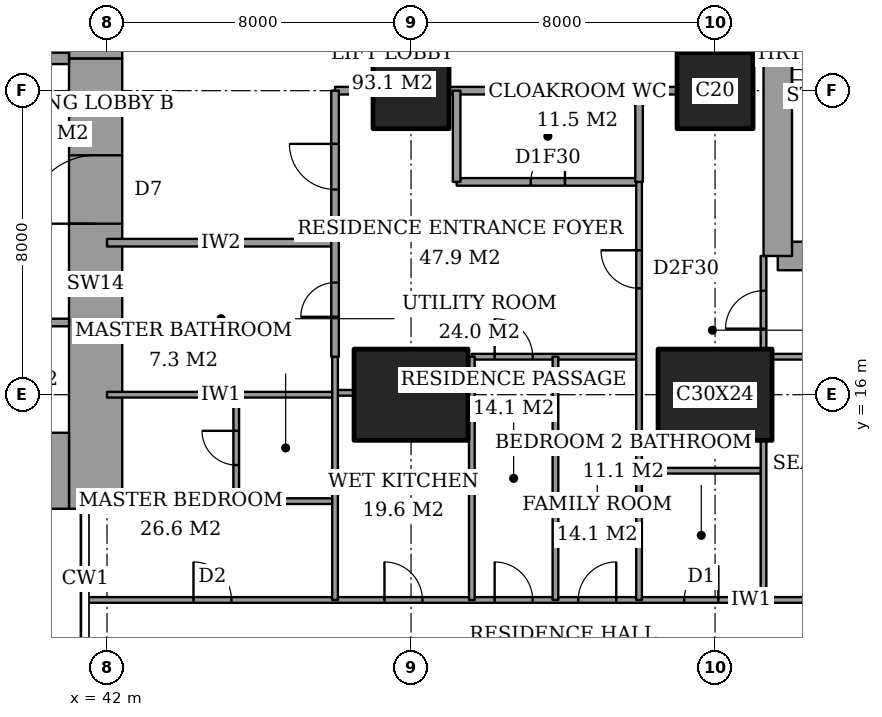
"""IFC4 building model, lengths in metres.
Left out: names, types, materials, properties, quantities, classifications, styles, units other than length and angle.
Written with IfcOpenShell. Run it as: python <this file> out.ifc"""

import sys

from ifc_helpers import new_model, si_unit, direction, frame, frame_2d, origin, origin_2d, place, context, subcontext, project, spatial, rectangle, extrude, element, fill, save


model = new_model("IFC4")
c1 = context("Model", 3, precision=1e-05, world=origin(), true_north=direction((0.0, 1.0)))
c2 = subcontext(c1, "Body", "Model", "MODEL_VIEW")
j1 = project(units=[si_unit("LENGTHUNIT", "METRE"), si_unit("PLANEANGLEUNIT", "RADIAN")], contexts=[c1])
p1 = place(None, origin())
s1 = spatial("IfcSite", under=j1, at=p1, CompositionType="ELEMENT")
p2 = place(p1, origin())
s2 = spatial("IfcBuilding", under=s1, at=p2, CompositionType="ELEMENT")
p3 = place(p2, frame((0.0, 0.0, 83.6)))
s3 = spatial("IfcBuildingStorey", under=s2, at=p3, CompositionType="ELEMENT", Elevation=83.6)
p4 = place(p3, frame((50.0, 16.0, 0.0), z_axis=(0.0, 0.0, 1.0), x_axis=(1.0, 0.0, 0.0)))
e1 = element("IfcColumn", 1, at=p4, inside=s3, PredefinedType="COLUMN", context=c2, shape_type="SweptSolid", body=[
    extrude(rectangle(XDim=3.0, YDim=2.4, at=origin_2d()), origin(), (0.0, 0.0, 1.0), 3.6),
])
p5 = place(p3, frame((50.0, 24.0, 0.0), z_axis=(0.0, 0.0, 1.0), x_axis=(1.0, 0.0, 0.0)))
e2 = element("IfcColumn", 2, at=p5, inside=s3, PredefinedType="COLUMN", context=c2, shape_type="SweptSolid", body=[
    extrude(rectangle(XDim=2.0, YDim=2.0, at=origin_2d()), origin(), (0.0, 0.0, 1.0), 3.6),
])
p6 = place(p3, frame((58.0, 16.0, 0.0), z_axis=(0.0, 0.0, 1.0), x_axis=(1.0, 0.0, 0.0)))
e3 = element("IfcColumn", 3, at=p6, inside=s3, PredefinedType="COLUMN", context=c2, shape_type="SweptSolid", body=[
    extrude(rectangle(XDim=3.0, YDim=2.4, at=origin_2d()), origin(), (0.0, 0.0, 1.0), 3.6),
])
p7 = place(p3, frame((58.0, 24.0, 0.0), z_axis=(0.0, 0.0, 1.0), x_axis=(1.0, 0.0, 0.0)))
e4 = element("IfcColumn", 4, at=p7, inside=s3, PredefinedType="COLUMN", context=c2, shape_type="SweptSolid", body=[
    extrude(rectangle(XDim=2.0, YDim=2.0, at=origin_2d()), origin(), (0.0, 0.0, 1.0), 3.6),
])
p8 = place(p3, frame((37.85, 14.0, 0.0), z_axis=(0.0, 0.0, 1.0), x_axis=(1.0, 0.0, 0.0)))
e5 = element("IfcWall", 5, at=p8, inside=s3, PredefinedType="SHEAR", context=c2, shape_type="SweptSolid", body=[
    extrude(rectangle(XDim=3.15, YDim=2.0, at=frame_2d((1.575, 0.0))), origin(), (0.0, 0.0, 1.0), 3.6),
])
p9 = place(p3, frame((41.7, 13.0, 0.0), z_axis=(0.0, 0.0, 1.0), x_axis=(0.0, 1.0, 0.0)))
e6 = element("IfcWall", 6, at=p9, inside=s3, PredefinedType="SHEAR", context=c2, shape_type="SweptSolid", body=[
    extrude(rectangle(XDim=11.85, YDim=1.4, at=frame_2d((5.925, 0.0))), origin(), (0.0, 0.0, 1.0), 3.6),
])
p10 = place(p9, frame((7.5, 0.0, 0.0)))
e7 = element("IfcOpeningElement", 7, at=p10, cuts=e6, PredefinedType="OPENING", context=c2, shape_type="SweptSolid", body=[
    extrude(rectangle(XDim=1.8, YDim=2.4, at=frame_2d((0.9, 1.2))), frame((0.0, 0.71, 0.0), z_axis=(0.0, -1.0, 0.0), x_axis=(1.0, 0.0, 0.0)), (0.0, 0.0, 1.0), 1.42),
])
p11 = place(p3, frame((41.7, 24.85, 0.0), z_axis=(0.0, 0.0, 1.0), x_axis=(0.0, 1.0, 0.0)))
e8 = element("IfcWall", 8, at=p11, inside=s3, PredefinedType="SHEAR", context=c2, shape_type="SweptSolid", body=[
    extrude(rectangle(XDim=10.15, YDim=1.4, at=frame_2d((5.075, 0.0))), origin(), (0.0, 0.0, 1.0), 3.6),
])
p12 = place(p3, frame((37.85, 24.85, 0.0), z_axis=(0.0, 0.0, 1.0), x_axis=(1.0, 0.0, 0.0)))
e9 = element("IfcWall", 9, at=p12, inside=s3, PredefinedType="SHEAR", context=c2, shape_type="SweptSolid", body=[
    extrude(rectangle(XDim=3.15, YDim=0.3, at=frame_2d((1.575, 0.0))), origin(), (0.0, 0.0, 1.0), 3.6),
])
p13 = place(p12, frame((0.95, 0.0, 0.0)))
e10 = element("IfcOpeningElement", 10, at=p13, cuts=e9, PredefinedType="OPENING", context=c2, shape_type="SweptSolid", body=[
    extrude(rectangle(XDim=1.0, YDim=2.1, at=frame_2d((0.5, 1.05))), frame((0.0, 0.16, 0.0), z_axis=(0.0, -1.0, 0.0), x_axis=(1.0, 0.0, 0.0)), (0.0, 0.0, 1.0), 0.32),
])
p14 = place(p3, frame((59.65, 19.65, 0.0), z_axis=(0.0, 0.0, 1.0), x_axis=(1.0, 0.0, 0.0)))
e11 = element("IfcWall", 11, at=p14, inside=s3, PredefinedType="SHEAR", context=c2, shape_type="SweptSolid", body=[
    extrude(rectangle(XDim=4.45, YDim=0.75, at=frame_2d((2.225, 0.0))), origin(), (0.0, 0.0, 1.0), 3.6),
])
p15 = place(p3, frame((59.65, 28.35, 0.0), z_axis=(0.0, 0.0, 1.0), x_axis=(0.0, -1.0, 0.0)))
e12 = element("IfcWall", 12, at=p15, inside=s3, PredefinedType="SHEAR", context=c2, shape_type="SweptSolid", body=[
    extrude(rectangle(XDim=8.7, YDim=0.75, at=frame_2d((4.35, 0.0))), origin(), (0.0, 0.0, 1.0), 3.6),
])
p16 = place(p15, frame((0.975, 0.0, 0.0)))
e13 = element("IfcOpeningElement", 13, at=p16, cuts=e12, PredefinedType="OPENING", context=c2, shape_type="SweptSolid", body=[
    extrude(rectangle(XDim=1.0, YDim=2.1, at=frame_2d((0.5, 1.05))), frame((0.0, 0.385, 0.0), z_axis=(0.0, -1.0, 0.0), x_axis=(1.0, 0.0, 0.0)), (0.0, 0.0, 1.0), 0.77),
])
p17 = place(p3, frame((41.439, 10.6, 0.0), z_axis=(0.0, 0.0, 1.0), x_axis=(1.0, 0.0, 0.0)))
e14 = element("IfcWall", 14, at=p17, inside=s3, PredefinedType="PARTITIONING", context=c2, shape_type="SweptSolid", body=[
    extrude(rectangle(XDim=25.011, YDim=0.15, at=frame_2d((12.505, 0.0))), origin(), (0.0, 0.0, 1.0), 3.35),
])
p18 = place(p17, frame((10.761, 0.0, 0.0)))
e15 = element("IfcOpeningElement", 15, at=p18, cuts=e14, PredefinedType="OPENING", context=c2, shape_type="SweptSolid", body=[
    extrude(rectangle(XDim=1.0, YDim=2.1, at=frame_2d((0.5, 1.05))), frame((0.0, 0.085, 0.0), z_axis=(0.0, -1.0, 0.0), x_axis=(1.0, 0.0, 0.0)), (0.0, 0.0, 1.0), 0.17),
])
p19 = place(p17, frame((20.924, 0.0, 0.0)))
e16 = element("IfcOpeningElement", 16, at=p19, cuts=e14, PredefinedType="OPENING", context=c2, shape_type="SweptSolid", body=[
    extrude(rectangle(XDim=1.0, YDim=2.1, at=frame_2d((0.5, 1.05))), frame((0.0, 0.085, 0.0), z_axis=(0.0, -1.0, 0.0), x_axis=(1.0, 0.0, 0.0)), (0.0, 0.0, 1.0), 0.17),
])
p20 = place(p17, frame((15.749, 0.0, 0.0)))
e17 = element("IfcOpeningElement", 17, at=p20, cuts=e14, PredefinedType="OPENING", context=c2, shape_type="SweptSolid", body=[
    extrude(rectangle(XDim=0.9, YDim=2.1, at=frame_2d((0.45, 1.05))), frame((0.0, 0.085, 0.0), z_axis=(0.0, -1.0, 0.0), x_axis=(1.0, 0.0, 0.0)), (0.0, 0.0, 1.0), 0.17),
])
p21 = place(p17, frame((12.961, 0.0, 0.0)))
e18 = element("IfcOpeningElement", 18, at=p21, cuts=e14, PredefinedType="OPENING", context=c2, shape_type="SweptSolid", body=[
    extrude(rectangle(XDim=1.0, YDim=2.1, at=frame_2d((0.5, 1.05))), frame((0.0, 0.085, 0.0), z_axis=(0.0, -1.0, 0.0), x_axis=(1.0, 0.0, 0.0)), (0.0, 0.0, 1.0), 0.17),
])
p22 = place(p17, frame((7.861, 0.0, 0.0)))
e19 = element("IfcOpeningElement", 19, at=p22, cuts=e14, PredefinedType="OPENING", context=c2, shape_type="SweptSolid", body=[
    extrude(rectangle(XDim=1.0, YDim=2.1, at=frame_2d((0.5, 1.05))), frame((0.0, 0.085, 0.0), z_axis=(0.0, -1.0, 0.0), x_axis=(1.0, 0.0, 0.0)), (0.0, 0.0, 1.0), 0.17),
])
p23 = place(p17, frame((2.836, 0.0, 0.0)))
e20 = element("IfcOpeningElement", 20, at=p23, cuts=e14, PredefinedType="OPENING", context=c2, shape_type="SweptSolid", body=[
    extrude(rectangle(XDim=1.0, YDim=2.1, at=frame_2d((0.5, 1.05))), frame((0.0, 0.085, 0.0), z_axis=(0.0, -1.0, 0.0), x_axis=(1.0, 0.0, 0.0)), (0.0, 0.0, 1.0), 0.17),
])
p24 = place(p3, frame((45.4, 13.2, 0.0), z_axis=(0.0, 0.0, 1.0), x_axis=(1.0, 0.0, 0.0)))
e21 = element("IfcWall", 21, at=p24, inside=s3, PredefinedType="PARTITIONING", context=c2, shape_type="SweptSolid", body=[
    extrude(rectangle(XDim=2.6, YDim=0.15, at=frame_2d((1.3, 0.0))), origin(), (0.0, 0.0, 1.0), 3.35),
])
p25 = place(p3, frame((56.0, 14.0, 0.0), z_axis=(0.0, 0.0, 1.0), x_axis=(1.0, 0.0, 0.0)))
e22 = element("IfcWall", 22, at=p25, inside=s3, PredefinedType="PARTITIONING", context=c2, shape_type="SweptSolid", body=[
    extrude(rectangle(XDim=3.275, YDim=0.15, at=frame_2d((1.637, 0.0))), origin(), (0.0, 0.0, 1.0), 3.35),
])
p26 = place(p3, frame((42.0, 16.0, 0.0), z_axis=(0.0, 0.0, 1.0), x_axis=(1.0, 0.0, 0.0)))
e23 = element("IfcWall", 23, at=p26, inside=s3, PredefinedType="PARTITIONING", context=c2, shape_type="SweptSolid", body=[
    extrude(rectangle(XDim=6.0, YDim=0.15, at=frame_2d((3.0, 0.0))), origin(), (0.0, 0.0, 1.0), 2.634),
])
p27 = place(p3, frame((48.0, 16.05, 0.0), z_axis=(0.0, 0.0, 1.0), x_axis=(1.0, 0.0, 0.0)))
e24 = element("IfcWall", 24, at=p27, inside=s3, PredefinedType="PARTITIONING", context=c2, shape_type="SweptSolid", body=[
    extrude(rectangle(XDim=0.5, YDim=0.15, at=frame_2d((0.25, 0.0))), origin(), (0.0, 0.0, 1.0), 2.634),
])
p28 = place(p3, frame((51.6, 17.0, 0.0), z_axis=(0.0, 0.0, 1.0), x_axis=(1.0, 0.0, 0.0)))
e25 = element("IfcWall", 25, at=p28, inside=s3, PredefinedType="PARTITIONING", context=c2, shape_type="SweptSolid", body=[
    extrude(rectangle(XDim=4.4, YDim=0.15, at=frame_2d((2.2, 0.0))), origin(), (0.0, 0.0, 1.0), 3.35),
])
p29 = place(p28, frame((0.6, 0.0, 0.0)))
e26 = element("IfcOpeningElement", 26, at=p29, cuts=e25, PredefinedType="OPENING", context=c2, shape_type="SweptSolid", body=[
    extrude(rectangle(XDim=1.0, YDim=2.1, at=frame_2d((0.5, 1.05))), frame((0.0, 0.085, 0.0), z_axis=(0.0, -1.0, 0.0), x_axis=(1.0, 0.0, 0.0)), (0.0, 0.0, 1.0), 0.17),
])
p30 = place(p3, frame((59.5, 17.0, 0.0), z_axis=(0.0, 0.0, 1.0), x_axis=(1.0, 0.0, 0.0)))
e27 = element("IfcWall", 27, at=p30, inside=s3, PredefinedType="PARTITIONING", context=c2, shape_type="SweptSolid", body=[
    extrude(rectangle(XDim=5.15, YDim=0.15, at=frame_2d((2.575, 0.0))), origin(), (0.0, 0.0, 1.0), 3.35),
])
p31 = place(p3, frame((42.0, 20.0, 0.0), z_axis=(0.0, 0.0, 1.0), x_axis=(1.0, 0.0, 0.0)))
e28 = element("IfcWall", 28, at=p31, inside=s3, PredefinedType="PARTITIONING", context=c2, shape_type="SweptSolid", body=[
    extrude(rectangle(XDim=6.0, YDim=0.2, at=frame_2d((3.0, 0.0))), origin(), (0.0, 0.0, 1.0), 3.35),
])
p32 = place(p3, frame((51.2, 21.6, 0.0), z_axis=(0.0, 0.0, 1.0), x_axis=(1.0, 0.0, 0.0)))
e29 = element("IfcWall", 29, at=p32, inside=s3, PredefinedType="PARTITIONING", context=c2, shape_type="SweptSolid", body=[
    extrude(rectangle(XDim=4.8, YDim=0.2, at=frame_2d((2.4, 0.0))), origin(), (0.0, 0.0, 1.0), 3.35),
])
p33 = place(p32, frame((1.95, 0.0, 0.0)))
e30 = element("IfcOpeningElement", 30, at=p33, cuts=e29, PredefinedType="OPENING", context=c2, shape_type="SweptSolid", body=[
    extrude(rectangle(XDim=0.9, YDim=2.1, at=frame_2d((0.45, 1.05))), frame((0.0, 0.11, 0.0), z_axis=(0.0, -1.0, 0.0), x_axis=(1.0, 0.0, 0.0)), (0.0, 0.0, 1.0), 0.22),
])
p34 = place(p3, frame((48.0, 24.0, 0.0), z_axis=(0.0, 0.0, 1.0), x_axis=(1.0, 0.0, 0.0)))
e31 = element("IfcWall", 31, at=p34, inside=s3, PredefinedType="PARTITIONING", context=c2, shape_type="SweptSolid", body=[
    extrude(rectangle(XDim=1.0, YDim=0.2, at=frame_2d((0.5, 0.0))), origin(), (0.0, 0.0, 1.0), 3.35),
])
p35 = place(p3, frame((51.0, 24.0, 0.0), z_axis=(0.0, 0.0, 1.0), x_axis=(1.0, 0.0, 0.0)))
e32 = element("IfcWall", 32, at=p35, inside=s3, PredefinedType="PARTITIONING", context=c2, shape_type="SweptSolid", body=[
    extrude(rectangle(XDim=6.0, YDim=0.2, at=frame_2d((3.0, 0.0))), origin(), (0.0, 0.0, 1.0), 3.35),
])
p36 = place(p3, frame((45.4, 13.2, 0.0), z_axis=(0.0, 0.0, 1.0), x_axis=(0.0, 1.0, 0.0)))
e33 = element("IfcWall", 33, at=p36, inside=s3, PredefinedType="PARTITIONING", context=c2, shape_type="SweptSolid", body=[
    extrude(rectangle(XDim=2.8, YDim=0.15, at=frame_2d((1.4, 0.0))), origin(), (0.0, 0.0, 1.0), 3.35),
])
p37 = place(p36, frame((0.95, 0.0, 0.0)))
e34 = element("IfcOpeningElement", 34, at=p37, cuts=e33, PredefinedType="OPENING", context=c2, shape_type="SweptSolid", body=[
    extrude(rectangle(XDim=0.9, YDim=2.1, at=frame_2d((0.45, 1.05))), frame((0.0, 0.085, 0.0), z_axis=(0.0, -1.0, 0.0), x_axis=(1.0, 0.0, 0.0)), (0.0, 0.0, 1.0), 0.17),
])
p38 = place(p3, frame((48.0, 17.0, 0.0), z_axis=(0.0, 0.0, 1.0), x_axis=(0.0, 1.0, 0.0)))
e35 = element("IfcWall", 35, at=p38, inside=s3, PredefinedType="PARTITIONING", context=c2, shape_type="SweptSolid", body=[
    extrude(rectangle(XDim=7.0, YDim=0.2, at=frame_2d((3.5, 0.0))), origin(), (0.0, 0.0, 1.0), 3.35),
])
p39 = place(p38, frame((4.4, 0.0, 0.0)))
e36 = element("IfcOpeningElement", 36, at=p39, cuts=e35, PredefinedType="OPENING", context=c2, shape_type="SweptSolid", body=[
    extrude(rectangle(XDim=1.2, YDim=2.4, at=frame_2d((0.6, 1.2))), frame((0.0, 0.11, 0.0), z_axis=(0.0, -1.0, 0.0), x_axis=(1.0, 0.0, 0.0)), (0.0, 0.0, 1.0), 0.22),
])
p40 = place(p38, frame((1.05, 0.0, 0.0)))
e37 = element("IfcOpeningElement", 37, at=p40, cuts=e35, PredefinedType="OPENING", context=c2, shape_type="SweptSolid", body=[
    extrude(rectangle(XDim=0.9, YDim=2.1, at=frame_2d((0.45, 1.05))), frame((0.0, 0.11, 0.0), z_axis=(0.0, -1.0, 0.0), x_axis=(1.0, 0.0, 0.0)), (0.0, 0.0, 1.0), 0.22),
])
p41 = place(p3, frame((48.0, 10.6, 0.0), z_axis=(0.0, 0.0, 1.0), x_axis=(0.0, 1.0, 0.0)))
e38 = element("IfcWall", 38, at=p41, inside=s3, PredefinedType="PARTITIONING", context=c2, shape_type="SweptSolid", body=[
    extrude(rectangle(XDim=6.4, YDim=0.15, at=frame_2d((3.2, 0.0))), origin(), (0.0, 0.0, 1.0), 3.35),
])
p42 = place(p3, frame((51.2, 21.6, 0.0), z_axis=(0.0, 0.0, 1.0), x_axis=(0.0, 1.0, 0.0)))
e39 = element("IfcWall", 39, at=p42, inside=s3, PredefinedType="PARTITIONING", context=c2, shape_type="SweptSolid", body=[
    extrude(rectangle(XDim=2.4, YDim=0.2, at=frame_2d((1.2, 0.0))), origin(), (0.0, 0.0, 1.0), 3.35),
])
for number, where, z_axis, x_axis in (
    (40, (51.6, 10.6, 0.0), (0.0, 0.0, 1.0), (0.0, 1.0, 0.0)),
    (41, (53.8, 10.6, 0.0), (0.0, 0.0, 1.0), (0.0, 1.0, 0.0)),
):
    element("IfcWall", number, at=place(p3, frame(where, z_axis=z_axis, x_axis=x_axis)), inside=s3, PredefinedType="PARTITIONING", context=c2, shape_type="SweptSolid", body=[
        extrude(rectangle(XDim=6.4, YDim=0.15, at=frame_2d((3.2, 0.0))), origin(), (0.0, 0.0, 1.0), 3.35),
    ])
p43 = place(p3, frame((56.0, 21.6, 0.0), z_axis=(0.0, 0.0, 1.0), x_axis=(0.0, 1.0, 0.0)))
e42 = element("IfcWall", 42, at=p43, inside=s3, PredefinedType="PARTITIONING", context=c2, shape_type="SweptSolid", body=[
    extrude(rectangle(XDim=2.4, YDim=0.2, at=frame_2d((1.2, 0.0))), origin(), (0.0, 0.0, 1.0), 3.35),
])
p44 = place(p3, frame((56.0, 10.6, 0.0), z_axis=(0.0, 0.0, 1.0), x_axis=(0.0, 1.0, 0.0)))
e43 = element("IfcWall", 43, at=p44, inside=s3, PredefinedType="PARTITIONING", context=c2, shape_type="SweptSolid", body=[
    extrude(rectangle(XDim=11.0, YDim=0.15, at=frame_2d((5.5, 0.0))), origin(), (0.0, 0.0, 1.0), 3.35),
])
p45 = place(p44, frame((8.2, 0.0, 0.0)))
e44 = element("IfcOpeningElement", 44, at=p45, cuts=e43, PredefinedType="OPENING", context=c2, shape_type="SweptSolid", body=[
    extrude(rectangle(XDim=1.0, YDim=2.1, at=frame_2d((0.5, 1.05))), frame((0.0, 0.085, 0.0), z_axis=(0.0, -1.0, 0.0), x_axis=(1.0, 0.0, 0.0)), (0.0, 0.0, 1.0), 0.17),
])
p46 = place(p3, frame((59.275, 10.6, 0.0), z_axis=(0.0, 0.0, 1.0), x_axis=(0.0, 1.0, 0.0)))
e45 = element("IfcWall", 45, at=p46, inside=s3, PredefinedType="PARTITIONING", context=c2, shape_type="SweptSolid", body=[
    extrude(rectangle(XDim=4.2, YDim=0.15, at=frame_2d((2.1, 0.0))), origin(), (0.0, 0.0, 1.0), 3.35),
])
p47 = place(p3, frame((59.275, 17.2, 0.0), z_axis=(0.0, 0.0, 1.0), x_axis=(0.0, 1.0, 0.0)))
e46 = element("IfcWall", 46, at=p47, inside=s3, PredefinedType="PARTITIONING", context=c2, shape_type="SweptSolid", body=[
    extrude(rectangle(XDim=2.45, YDim=0.15, at=frame_2d((1.225, 0.0))), origin(), (0.0, 0.0, 1.0), 3.35),
])
p48 = place(p47, frame((0.538, 0.0, 0.0)))
e47 = element("IfcOpeningElement", 47, at=p48, cuts=e46, PredefinedType="OPENING", context=c2, shape_type="SweptSolid", body=[
    extrude(rectangle(XDim=1.0, YDim=2.1, at=frame_2d((0.5, 1.05))), frame((0.0, 0.085, 0.0), z_axis=(0.0, -1.0, 0.0), x_axis=(1.0, 0.0, 0.0)), (0.0, 0.0, 1.0), 0.17),
])
p49 = place(p3, frame((28.3, 17.9, 0.0), z_axis=(0.0, 0.0, 1.0), x_axis=(1.0, 0.0, 0.0)))
e48 = element("IfcWall", 48, at=p49, inside=s3, PredefinedType="PARTITIONING", context=c2, shape_type="SweptSolid", body=[
    extrude(rectangle(XDim=12.7, YDim=0.2, at=frame_2d((6.35, 0.0))), origin(), (0.0, 0.0, 1.0), 3.6),
])
p50 = place(p49, frame((0.95, 0.0, 0.0)))
e49 = element("IfcOpeningElement", 49, at=p50, cuts=e48, PredefinedType="OPENING", context=c2, shape_type="SweptSolid", body=[
    extrude(rectangle(XDim=1.1, YDim=2.1, at=frame_2d((0.55, 1.05))), frame((0.0, 0.11, 0.0), z_axis=(0.0, -1.0, 0.0), x_axis=(1.0, 0.0, 0.0)), (0.0, 0.0, 1.0), 0.22),
])
p51 = place(p49, frame((4.15, 0.0, 0.0)))
e50 = element("IfcOpeningElement", 50, at=p51, cuts=e48, PredefinedType="OPENING", context=c2, shape_type="SweptSolid", body=[
    extrude(rectangle(XDim=1.1, YDim=2.1, at=frame_2d((0.55, 1.05))), frame((0.0, 0.11, 0.0), z_axis=(0.0, -1.0, 0.0), x_axis=(1.0, 0.0, 0.0)), (0.0, 0.0, 1.0), 0.22),
])
p52 = place(p49, frame((7.35, 0.0, 0.0)))
e51 = element("IfcOpeningElement", 51, at=p52, cuts=e48, PredefinedType="OPENING", context=c2, shape_type="SweptSolid", body=[
    extrude(rectangle(XDim=1.1, YDim=2.1, at=frame_2d((0.55, 1.05))), frame((0.0, 0.11, 0.0), z_axis=(0.0, -1.0, 0.0), x_axis=(1.0, 0.0, 0.0)), (0.0, 0.0, 1.0), 0.22),
])
p53 = place(p49, frame((10.6, 0.0, 0.0)))
e52 = element("IfcOpeningElement", 52, at=p53, cuts=e48, PredefinedType="OPENING", context=c2, shape_type="SweptSolid", body=[
    extrude(rectangle(XDim=1.2, YDim=2.1, at=frame_2d((0.6, 1.05))), frame((0.0, 0.11, 0.0), z_axis=(0.0, -1.0, 0.0), x_axis=(1.0, 0.0, 0.0)), (0.0, 0.0, 1.0), 0.22),
])
p54 = place(p18, origin())
e53 = element("IfcDoor", 53, at=p54, inside=s3, OperationType="SINGLE_SWING_RIGHT", PredefinedType="DOOR", context=c2, shape_type="SweptSolid", body=[
    extrude(rectangle(XDim=1.0, YDim=2.1, at=frame_2d((0.5, 1.05))), frame((0.0, 0.025, 0.0), z_axis=(0.0, -1.0, 0.0), x_axis=(1.0, 0.0, 0.0)), (0.0, 0.0, 1.0), 0.05),
])
fill(e15, e53)
p55 = place(p48, origin())
e54 = element("IfcDoor", 54, at=p55, inside=s3, OperationType="SINGLE_SWING_RIGHT", PredefinedType="DOOR", context=c2, shape_type="SweptSolid", body=[
    extrude(rectangle(XDim=1.0, YDim=2.1, at=frame_2d((0.5, 1.05))), frame((0.0, 0.025, 0.0), z_axis=(0.0, -1.0, 0.0), x_axis=(1.0, 0.0, 0.0)), (0.0, 0.0, 1.0), 0.05),
])
fill(e47, e54)
p56 = place(p20, origin())
e55 = element("IfcDoor", 55, at=p56, inside=s3, OperationType="SINGLE_SWING_LEFT", PredefinedType="DOOR", context=c2, shape_type="SweptSolid", body=[
    extrude(rectangle(XDim=0.9, YDim=2.1, at=frame_2d((0.45, 1.05))), frame((0.0, 0.025, 0.0), z_axis=(0.0, -1.0, 0.0), x_axis=(1.0, 0.0, 0.0)), (0.0, 0.0, 1.0), 0.05),
])
fill(e17, e55)
p57 = place(p45, origin())
e56 = element("IfcDoor", 56, at=p57, inside=s3, OperationType="SINGLE_SWING_LEFT", PredefinedType="DOOR", context=c2, shape_type="SweptSolid", body=[
    extrude(rectangle(XDim=1.0, YDim=2.1, at=frame_2d((0.5, 1.05))), frame((0.0, 0.025, 0.0), z_axis=(0.0, -1.0, 0.0), x_axis=(1.0, 0.0, 0.0)), (0.0, 0.0, 1.0), 0.05),
])
fill(e44, e56)
p58 = place(p33, origin())
e57 = element("IfcDoor", 57, at=p58, inside=s3, OperationType="SINGLE_SWING_LEFT", PredefinedType="DOOR", context=c2, shape_type="SweptSolid", body=[
    extrude(rectangle(XDim=0.9, YDim=2.1, at=frame_2d((0.45, 1.05))), frame((0.0, 0.025, 0.0), z_axis=(0.0, -1.0, 0.0), x_axis=(1.0, 0.0, 0.0)), (0.0, 0.0, 1.0), 0.05),
])
fill(e30, e57)
p59 = place(p39, origin())
e58 = element("IfcDoor", 58, at=p59, inside=s3, OperationType="SINGLE_SWING_LEFT", PredefinedType="DOOR", context=c2, shape_type="SweptSolid", body=[
    extrude(rectangle(XDim=1.2, YDim=2.4, at=frame_2d((0.6, 1.2))), frame((0.0, 0.025, 0.0), z_axis=(0.0, -1.0, 0.0), x_axis=(1.0, 0.0, 0.0)), (0.0, 0.0, 1.0), 0.05),
])
fill(e36, e58)
p60 = place(p21, origin())
e59 = element("IfcDoor", 59, at=p60, inside=s3, OperationType="SINGLE_SWING_LEFT", PredefinedType="DOOR", context=c2, shape_type="SweptSolid", body=[
    extrude(rectangle(XDim=1.0, YDim=2.1, at=frame_2d((0.5, 1.05))), frame((0.0, 0.025, 0.0), z_axis=(0.0, -1.0, 0.0), x_axis=(1.0, 0.0, 0.0)), (0.0, 0.0, 1.0), 0.05),
])
fill(e18, e59)
p61 = place(p29, origin())
e60 = element("IfcDoor", 60, at=p61, inside=s3, OperationType="SINGLE_SWING_RIGHT", PredefinedType="DOOR", context=c2, shape_type="SweptSolid", body=[
    extrude(rectangle(XDim=1.0, YDim=2.1, at=frame_2d((0.5, 1.05))), frame((0.0, 0.025, 0.0), z_axis=(0.0, -1.0, 0.0), x_axis=(1.0, 0.0, 0.0)), (0.0, 0.0, 1.0), 0.05),
])
fill(e26, e60)
p62 = place(p22, origin())
e61 = element("IfcDoor", 61, at=p62, inside=s3, OperationType="SINGLE_SWING_RIGHT", PredefinedType="DOOR", context=c2, shape_type="SweptSolid", body=[
    extrude(rectangle(XDim=1.0, YDim=2.1, at=frame_2d((0.5, 1.05))), frame((0.0, 0.025, 0.0), z_axis=(0.0, -1.0, 0.0), x_axis=(1.0, 0.0, 0.0)), (0.0, 0.0, 1.0), 0.05),
])
fill(e19, e61)
p63 = place(p37, origin())
e62 = element("IfcDoor", 62, at=p63, inside=s3, OperationType="SINGLE_SWING_LEFT", PredefinedType="DOOR", context=c2, shape_type="SweptSolid", body=[
    extrude(rectangle(XDim=0.9, YDim=2.1, at=frame_2d((0.45, 1.05))), frame((0.0, 0.025, 0.0), z_axis=(0.0, -1.0, 0.0), x_axis=(1.0, 0.0, 0.0)), (0.0, 0.0, 1.0), 0.05),
])
fill(e34, e62)
p64 = place(p23, origin())
e63 = element("IfcDoor", 63, at=p64, inside=s3, OperationType="SINGLE_SWING_RIGHT", PredefinedType="DOOR", context=c2, shape_type="SweptSolid", body=[
    extrude(rectangle(XDim=1.0, YDim=2.1, at=frame_2d((0.5, 1.05))), frame((0.0, 0.025, 0.0), z_axis=(0.0, -1.0, 0.0), x_axis=(1.0, 0.0, 0.0)), (0.0, 0.0, 1.0), 0.05),
])
fill(e20, e63)
p65 = place(p40, origin())
e64 = element("IfcDoor", 64, at=p65, inside=s3, OperationType="SINGLE_SWING_RIGHT", PredefinedType="DOOR", context=c2, shape_type="SweptSolid", body=[
    extrude(rectangle(XDim=0.9, YDim=2.1, at=frame_2d((0.45, 1.05))), frame((0.0, 0.025, 0.0), z_axis=(0.0, -1.0, 0.0), x_axis=(1.0, 0.0, 0.0)), (0.0, 0.0, 1.0), 0.05),
])
fill(e37, e64)
p66 = place(p10, origin())
e65 = element("IfcDoor", 65, at=p66, inside=s3, OperationType="DOUBLE_DOOR_DOUBLE_SWING", PredefinedType="DOOR", context=c2, shape_type="SweptSolid", body=[
    extrude(rectangle(XDim=1.8, YDim=2.4, at=frame_2d((0.9, 1.2))), frame((0.0, 0.025, 0.0), z_axis=(0.0, -1.0, 0.0), x_axis=(1.0, 0.0, 0.0)), (0.0, 0.0, 1.0), 0.05),
])
fill(e7, e65)
save(model, sys.argv[1])
